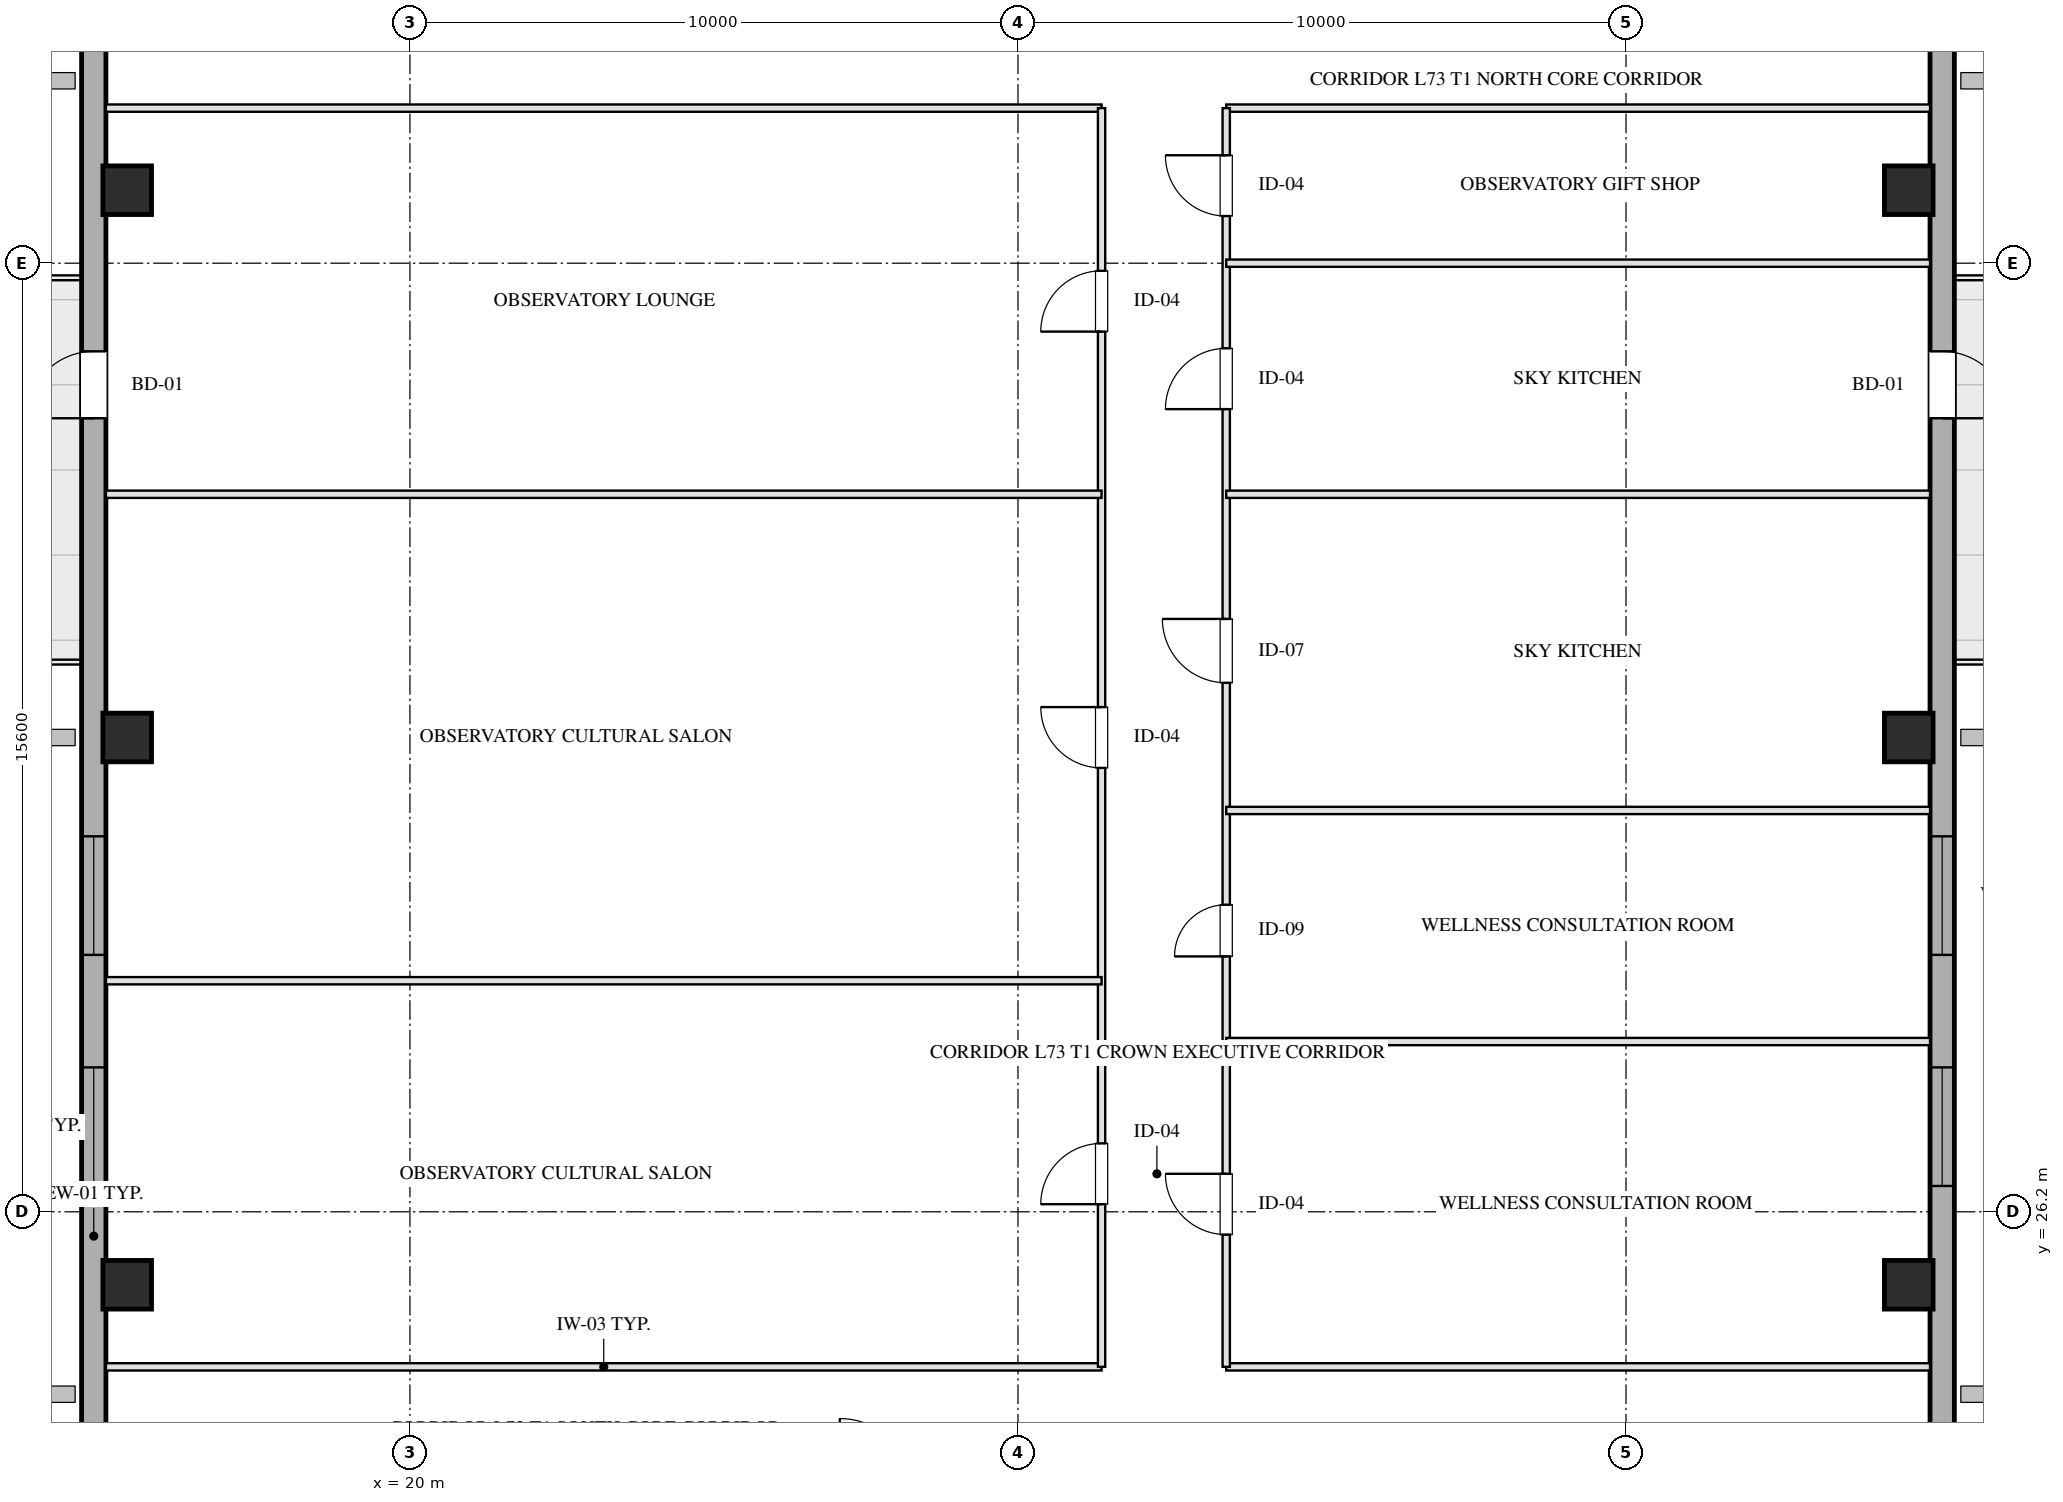
"""IFC4 building model, lengths in metres.
Left out: names, types, materials, properties, quantities, classifications, styles, units other than length and angle.
Written with IfcOpenShell. Run it as: python <this file> out.ifc"""

import sys

from ifc_helpers import new_model, si_unit, direction, frame, frame_2d, origin, origin_2d, place, context, subcontext, project, spatial, rectangle, hollow_rectangle, extrude, element, fill, save


model = new_model("IFC4")
c1 = context("Model", 3, precision=1e-05, world=origin(), true_north=direction((0.0, 1.0)))
c2 = subcontext(c1, "Body", "Model", "MODEL_VIEW")
j1 = project(units=[si_unit("LENGTHUNIT", "METRE"), si_unit("PLANEANGLEUNIT", "RADIAN")], contexts=[c1])
p1 = place(None, origin())
s1 = spatial("IfcSite", under=j1, at=p1, CompositionType="ELEMENT")
p2 = place(p1, origin())
s2 = spatial("IfcBuilding", under=s1, at=p2, CompositionType="ELEMENT")
p3 = place(p2, frame((0.0, 0.0, 266.4)))
s3 = spatial("IfcBuildingStorey", under=s2, at=p3, CompositionType="ELEMENT", Elevation=266.4)
for number, where, z_axis, x_axis in (
    (1, (15.35, 25.0, 0.0), (0.0, 0.0, 1.0), (1.0, 0.0, 0.0)),
    (2, (15.35, 34.0, 0.0), (0.0, 0.0, 1.0), (1.0, 0.0, 0.0)),
    (3, (15.35, 43.0, 0.0), (0.0, 0.0, 1.0), (1.0, 0.0, 0.0)),
    (4, (44.65, 25.0, 0.0), (0.0, 0.0, 1.0), (1.0, 0.0, 0.0)),
    (5, (44.65, 34.0, 0.0), (0.0, 0.0, 1.0), (1.0, 0.0, 0.0)),
    (6, (44.65, 43.0, 0.0), (0.0, 0.0, 1.0), (1.0, 0.0, 0.0)),
):
    element("IfcColumn", number, at=place(p3, frame(where, z_axis=z_axis, x_axis=x_axis)), inside=s3, PredefinedType="COLUMN", context=c2, shape_type="SweptSolid", body=[
        extrude(hollow_rectangle(XDim=0.8, YDim=0.8, WallThickness=0.028, at=origin_2d()), origin(), (0.0, 0.0, 1.0), 3.201),
    ])
p4 = place(p3, frame((14.8, 13.1, 0.0), z_axis=(0.0, 0.0, 1.0), x_axis=(0.0, 1.0, 0.0)))
e7 = element("IfcWall", 7, at=p4, inside=s3, PredefinedType="SOLIDWALL", context=c2, shape_type="SweptSolid", body=[
    extrude(rectangle(XDim=41.8, YDim=0.4, at=frame_2d((20.9, 0.0))), origin(), (0.0, 0.0, 1.0), 2.36),
])
p5 = place(p4, frame((13.525, 0.0, 0.75)))
e8 = element("IfcOpeningElement", 8, at=p5, cuts=e7, PredefinedType="OPENING", context=c2, shape_type="SweptSolid", body=[
    extrude(rectangle(XDim=1.95, YDim=1.21, at=frame_2d((0.975, 0.605))), frame((0.0, 0.21, 0.0), z_axis=(0.0, -1.0, 0.0), x_axis=(1.0, 0.0, 0.0)), (0.0, 0.0, 1.0), 0.42),
])
p6 = place(p4, frame((17.325, 0.0, 0.75)))
e9 = element("IfcOpeningElement", 9, at=p6, cuts=e7, PredefinedType="OPENING", context=c2, shape_type="SweptSolid", body=[
    extrude(rectangle(XDim=1.95, YDim=1.21, at=frame_2d((0.975, 0.605))), frame((0.0, 0.21, 0.0), z_axis=(0.0, -1.0, 0.0), x_axis=(1.0, 0.0, 0.0)), (0.0, 0.0, 1.0), 0.42),
])
p7 = place(p4, frame((26.15, 0.0, 0.0)))
e10 = element("IfcOpeningElement", 10, at=p7, cuts=e7, PredefinedType="OPENING", context=c2, shape_type="SweptSolid", body=[
    extrude(rectangle(XDim=1.1, YDim=2.15, at=frame_2d((0.55, 1.075))), frame((0.0, 0.21, 0.0), z_axis=(0.0, -1.0, 0.0), x_axis=(1.0, 0.0, 0.0)), (0.0, 0.0, 1.0), 0.42),
])
p8 = place(p3, frame((45.2, 54.9, 0.0), z_axis=(0.0, 0.0, 1.0), x_axis=(0.0, -1.0, 0.0)))
e11 = element("IfcWall", 11, at=p8, inside=s3, PredefinedType="SOLIDWALL", context=c2, shape_type="SweptSolid", body=[
    extrude(rectangle(XDim=41.8, YDim=0.4, at=frame_2d((20.9, 0.0))), origin(), (0.0, 0.0, 1.0), 2.36),
])
p9 = place(p8, frame((26.325, 0.0, 0.75)))
e12 = element("IfcOpeningElement", 12, at=p9, cuts=e11, PredefinedType="OPENING", context=c2, shape_type="SweptSolid", body=[
    extrude(rectangle(XDim=1.95, YDim=1.21, at=frame_2d((0.975, 0.605))), frame((0.0, 0.21, 0.0), z_axis=(0.0, -1.0, 0.0), x_axis=(1.0, 0.0, 0.0)), (0.0, 0.0, 1.0), 0.42),
])
p10 = place(p8, frame((22.525, 0.0, 0.75)))
e13 = element("IfcOpeningElement", 13, at=p10, cuts=e11, PredefinedType="OPENING", context=c2, shape_type="SweptSolid", body=[
    extrude(rectangle(XDim=1.95, YDim=1.21, at=frame_2d((0.975, 0.605))), frame((0.0, 0.21, 0.0), z_axis=(0.0, -1.0, 0.0), x_axis=(1.0, 0.0, 0.0)), (0.0, 0.0, 1.0), 0.42),
])
p11 = place(p8, frame((14.55, 0.0, 0.0)))
e14 = element("IfcOpeningElement", 14, at=p11, cuts=e11, PredefinedType="OPENING", context=c2, shape_type="SweptSolid", body=[
    extrude(rectangle(XDim=1.1, YDim=2.15, at=frame_2d((0.55, 1.075))), frame((0.0, 0.21, 0.0), z_axis=(0.0, -1.0, 0.0), x_axis=(1.0, 0.0, 0.0)), (0.0, 0.0, 1.0), 0.42),
])
p12 = place(p3, frame((15.0, 23.65, 0.0), z_axis=(0.0, 0.0, 1.0), x_axis=(1.0, 0.0, 0.0)))
e15 = element("IfcWall", 15, at=p12, inside=s3, PredefinedType="PARTITIONING", context=c2, shape_type="SweptSolid", body=[
    extrude(rectangle(XDim=16.375, YDim=0.12, at=frame_2d((8.188, 0.0))), origin(), (0.0, 0.0, 1.0), 2.925),
])
p13 = place(p3, frame((33.425, 23.65, 0.0), z_axis=(0.0, 0.0, 1.0), x_axis=(1.0, 0.0, 0.0)))
e16 = element("IfcWall", 16, at=p13, inside=s3, PredefinedType="PARTITIONING", context=c2, shape_type="SweptSolid", body=[
    extrude(rectangle(XDim=11.575, YDim=0.12, at=frame_2d((5.788, 0.0))), origin(), (0.0, 0.0, 1.0), 2.925),
])
p14 = place(p3, frame((15.0, 44.35, 0.0), z_axis=(0.0, 0.0, 1.0), x_axis=(1.0, 0.0, 0.0)))
e17 = element("IfcWall", 17, at=p14, inside=s3, PredefinedType="PARTITIONING", context=c2, shape_type="SweptSolid", body=[
    extrude(rectangle(XDim=16.375, YDim=0.12, at=frame_2d((8.188, 0.0))), origin(), (0.0, 0.0, 1.0), 2.925),
])
p15 = place(p3, frame((33.425, 44.35, 0.0), z_axis=(0.0, 0.0, 1.0), x_axis=(1.0, 0.0, 0.0)))
e18 = element("IfcWall", 18, at=p15, inside=s3, PredefinedType="PARTITIONING", context=c2, shape_type="SweptSolid", body=[
    extrude(rectangle(XDim=11.575, YDim=0.12, at=frame_2d((5.788, 0.0))), origin(), (0.0, 0.0, 1.0), 2.925),
])
p16 = place(p3, frame((31.375, 23.65, 0.0), z_axis=(0.0, 0.0, 1.0), x_axis=(0.0, 1.0, 0.0)))
e19 = element("IfcWall", 19, at=p16, inside=s3, PredefinedType="PARTITIONING", context=c2, shape_type="SweptSolid", body=[
    extrude(rectangle(XDim=20.7, YDim=0.12, at=frame_2d((10.35, 0.0))), origin(), (0.0, 0.0, 1.0), 2.925),
])
p17 = place(p16, frame((2.675, 0.0, 0.0)))
e20 = element("IfcOpeningElement", 20, at=p17, cuts=e19, PredefinedType="OPENING", context=c2, shape_type="SweptSolid", body=[
    extrude(rectangle(XDim=1.0, YDim=2.05, at=frame_2d((0.5, 1.025))), frame((0.0, 0.07, 0.0), z_axis=(0.0, -1.0, 0.0), x_axis=(1.0, 0.0, 0.0)), (0.0, 0.0, 1.0), 0.14),
])
p18 = place(p16, frame((9.85, 0.0, 0.0)))
e21 = element("IfcOpeningElement", 21, at=p18, cuts=e19, PredefinedType="OPENING", context=c2, shape_type="SweptSolid", body=[
    extrude(rectangle(XDim=1.0, YDim=2.05, at=frame_2d((0.5, 1.025))), frame((0.0, 0.07, 0.0), z_axis=(0.0, -1.0, 0.0), x_axis=(1.0, 0.0, 0.0)), (0.0, 0.0, 1.0), 0.14),
])
p19 = place(p16, frame((17.025, 0.0, 0.0)))
e22 = element("IfcOpeningElement", 22, at=p19, cuts=e19, PredefinedType="OPENING", context=c2, shape_type="SweptSolid", body=[
    extrude(rectangle(XDim=1.0, YDim=2.05, at=frame_2d((0.5, 1.025))), frame((0.0, 0.07, 0.0), z_axis=(0.0, -1.0, 0.0), x_axis=(1.0, 0.0, 0.0)), (0.0, 0.0, 1.0), 0.14),
])
p20 = place(p3, frame((33.425, 23.65, 0.0), z_axis=(0.0, 0.0, 1.0), x_axis=(0.0, 1.0, 0.0)))
e23 = element("IfcWall", 23, at=p20, inside=s3, PredefinedType="PARTITIONING", context=c2, shape_type="SweptSolid", body=[
    extrude(rectangle(XDim=20.7, YDim=0.12, at=frame_2d((10.35, 0.0))), origin(), (0.0, 0.0, 1.0), 2.925),
])
p21 = place(p20, frame((2.175, 0.0, 0.0)))
e24 = element("IfcOpeningElement", 24, at=p21, cuts=e23, PredefinedType="OPENING", context=c2, shape_type="SweptSolid", body=[
    extrude(rectangle(XDim=1.0, YDim=2.05, at=frame_2d((0.5, 1.025))), frame((0.0, 0.07, 0.0), z_axis=(0.0, -1.0, 0.0), x_axis=(1.0, 0.0, 0.0)), (0.0, 0.0, 1.0), 0.14),
])
p22 = place(p20, frame((6.75, 0.0, 0.0)))
e25 = element("IfcOpeningElement", 25, at=p22, cuts=e23, PredefinedType="OPENING", context=c2, shape_type="SweptSolid", body=[
    extrude(rectangle(XDim=0.85, YDim=2.05, at=frame_2d((0.425, 1.025))), frame((0.0, 0.07, 0.0), z_axis=(0.0, -1.0, 0.0), x_axis=(1.0, 0.0, 0.0)), (0.0, 0.0, 1.0), 0.14),
])
p23 = place(p20, frame((11.25, 0.0, 0.0)))
e26 = element("IfcOpeningElement", 26, at=p23, cuts=e23, PredefinedType="OPENING", context=c2, shape_type="SweptSolid", body=[
    extrude(rectangle(XDim=1.05, YDim=2.05, at=frame_2d((0.525, 1.025))), frame((0.0, 0.07, 0.0), z_axis=(0.0, -1.0, 0.0), x_axis=(1.0, 0.0, 0.0)), (0.0, 0.0, 1.0), 0.14),
])
p24 = place(p20, frame((15.75, 0.0, 0.0)))
e27 = element("IfcOpeningElement", 27, at=p24, cuts=e23, PredefinedType="OPENING", context=c2, shape_type="SweptSolid", body=[
    extrude(rectangle(XDim=1.0, YDim=2.05, at=frame_2d((0.5, 1.025))), frame((0.0, 0.07, 0.0), z_axis=(0.0, -1.0, 0.0), x_axis=(1.0, 0.0, 0.0)), (0.0, 0.0, 1.0), 0.14),
])
p25 = place(p20, frame((18.925, 0.0, 0.0)))
e28 = element("IfcOpeningElement", 28, at=p25, cuts=e23, PredefinedType="OPENING", context=c2, shape_type="SweptSolid", body=[
    extrude(rectangle(XDim=1.0, YDim=2.05, at=frame_2d((0.5, 1.025))), frame((0.0, 0.07, 0.0), z_axis=(0.0, -1.0, 0.0), x_axis=(1.0, 0.0, 0.0)), (0.0, 0.0, 1.0), 0.14),
])
for number, where, z_axis, x_axis in (
    (29, (15.0, 30.0, 0.0), (0.0, 0.0, 1.0), (1.0, 0.0, 0.0)),
    (30, (15.0, 38.0, 0.0), (0.0, 0.0, 1.0), (1.0, 0.0, 0.0)),
):
    element("IfcWall", number, at=place(p3, frame(where, z_axis=z_axis, x_axis=x_axis)), inside=s3, PredefinedType="PARTITIONING", context=c2, shape_type="SweptSolid", body=[
        extrude(rectangle(XDim=16.375, YDim=0.12, at=frame_2d((8.188, 0.0))), origin(), (0.0, 0.0, 1.0), 2.925),
    ])
for number, where, z_axis, x_axis in (
    (31, (33.425, 29.0, 0.0), (0.0, 0.0, 1.0), (1.0, 0.0, 0.0)),
    (32, (33.425, 32.8, 0.0), (0.0, 0.0, 1.0), (1.0, 0.0, 0.0)),
    (33, (33.425, 38.0, 0.0), (0.0, 0.0, 1.0), (1.0, 0.0, 0.0)),
    (34, (33.425, 41.8, 0.0), (0.0, 0.0, 1.0), (1.0, 0.0, 0.0)),
):
    element("IfcWall", number, at=place(p3, frame(where, z_axis=z_axis, x_axis=x_axis)), inside=s3, PredefinedType="PARTITIONING", context=c2, shape_type="SweptSolid", body=[
        extrude(rectangle(XDim=11.575, YDim=0.12, at=frame_2d((5.788, 0.0))), origin(), (0.0, 0.0, 1.0), 2.925),
    ])
p26 = place(p5, origin())
e35 = element("IfcWindow", 35, at=p26, inside=s3, PartitioningType="TRIPLE_PANEL_VERTICAL", PredefinedType="WINDOW", context=c2, shape_type="SweptSolid", body=[
    extrude(rectangle(XDim=1.95, YDim=1.21, at=frame_2d((0.975, 0.605))), frame((0.0, 0.03, 0.0), z_axis=(0.0, -1.0, 0.0), x_axis=(1.0, 0.0, 0.0)), (0.0, 0.0, 1.0), 0.06),
])
fill(e8, e35)
p27 = place(p6, origin())
e36 = element("IfcWindow", 36, at=p27, inside=s3, PartitioningType="TRIPLE_PANEL_VERTICAL", PredefinedType="WINDOW", context=c2, shape_type="SweptSolid", body=[
    extrude(rectangle(XDim=1.95, YDim=1.21, at=frame_2d((0.975, 0.605))), frame((0.0, 0.03, 0.0), z_axis=(0.0, -1.0, 0.0), x_axis=(1.0, 0.0, 0.0)), (0.0, 0.0, 1.0), 0.06),
])
fill(e9, e36)
p28 = place(p9, origin())
e37 = element("IfcWindow", 37, at=p28, inside=s3, PartitioningType="TRIPLE_PANEL_VERTICAL", PredefinedType="WINDOW", context=c2, shape_type="SweptSolid", body=[
    extrude(rectangle(XDim=1.95, YDim=1.21, at=frame_2d((0.975, 0.605))), frame((0.0, 0.03, 0.0), z_axis=(0.0, -1.0, 0.0), x_axis=(1.0, 0.0, 0.0)), (0.0, 0.0, 1.0), 0.06),
])
fill(e12, e37)
p29 = place(p10, origin())
e38 = element("IfcWindow", 38, at=p29, inside=s3, PartitioningType="TRIPLE_PANEL_VERTICAL", PredefinedType="WINDOW", context=c2, shape_type="SweptSolid", body=[
    extrude(rectangle(XDim=1.95, YDim=1.21, at=frame_2d((0.975, 0.605))), frame((0.0, 0.03, 0.0), z_axis=(0.0, -1.0, 0.0), x_axis=(1.0, 0.0, 0.0)), (0.0, 0.0, 1.0), 0.06),
])
fill(e13, e38)
p30 = place(p7, origin())
e39 = element("IfcDoor", 39, at=p30, inside=s3, OperationType="SINGLE_SWING_LEFT", PredefinedType="DOOR", context=c2, shape_type="SweptSolid", body=[
    extrude(rectangle(XDim=1.1, YDim=2.15, at=frame_2d((0.55, 1.075))), frame((0.0, 0.025, 0.0), z_axis=(0.0, -1.0, 0.0), x_axis=(1.0, 0.0, 0.0)), (0.0, 0.0, 1.0), 0.05),
])
fill(e10, e39)
p31 = place(p11, origin())
e40 = element("IfcDoor", 40, at=p31, inside=s3, OperationType="SINGLE_SWING_RIGHT", PredefinedType="DOOR", context=c2, shape_type="SweptSolid", body=[
    extrude(rectangle(XDim=1.1, YDim=2.15, at=frame_2d((0.55, 1.075))), frame((0.0, 0.025, 0.0), z_axis=(0.0, -1.0, 0.0), x_axis=(1.0, 0.0, 0.0)), (0.0, 0.0, 1.0), 0.05),
])
fill(e14, e40)
p32 = place(p17, origin())
e41 = element("IfcDoor", 41, at=p32, inside=s3, OperationType="SINGLE_SWING_LEFT", PredefinedType="DOOR", context=c2, shape_type="SweptSolid", body=[
    extrude(rectangle(XDim=1.0, YDim=2.05, at=frame_2d((0.5, 1.025))), frame((0.0, 0.025, 0.0), z_axis=(0.0, -1.0, 0.0), x_axis=(1.0, 0.0, 0.0)), (0.0, 0.0, 1.0), 0.05),
])
fill(e20, e41)
p33 = place(p18, origin())
e42 = element("IfcDoor", 42, at=p33, inside=s3, OperationType="SINGLE_SWING_RIGHT", PredefinedType="DOOR", context=c2, shape_type="SweptSolid", body=[
    extrude(rectangle(XDim=1.0, YDim=2.05, at=frame_2d((0.5, 1.025))), frame((0.0, 0.025, 0.0), z_axis=(0.0, -1.0, 0.0), x_axis=(1.0, 0.0, 0.0)), (0.0, 0.0, 1.0), 0.05),
])
fill(e21, e42)
p34 = place(p19, origin())
e43 = element("IfcDoor", 43, at=p34, inside=s3, OperationType="SINGLE_SWING_LEFT", PredefinedType="DOOR", context=c2, shape_type="SweptSolid", body=[
    extrude(rectangle(XDim=1.0, YDim=2.05, at=frame_2d((0.5, 1.025))), frame((0.0, 0.025, 0.0), z_axis=(0.0, -1.0, 0.0), x_axis=(1.0, 0.0, 0.0)), (0.0, 0.0, 1.0), 0.05),
])
fill(e22, e43)
p35 = place(p21, origin())
e44 = element("IfcDoor", 44, at=p35, inside=s3, OperationType="SINGLE_SWING_RIGHT", PredefinedType="DOOR", context=c2, shape_type="SweptSolid", body=[
    extrude(rectangle(XDim=1.0, YDim=2.05, at=frame_2d((0.5, 1.025))), frame((0.0, 0.025, 0.0), z_axis=(0.0, -1.0, 0.0), x_axis=(1.0, 0.0, 0.0)), (0.0, 0.0, 1.0), 0.05),
])
fill(e24, e44)
p36 = place(p22, origin())
e45 = element("IfcDoor", 45, at=p36, inside=s3, OperationType="SINGLE_SWING_LEFT", PredefinedType="DOOR", context=c2, shape_type="SweptSolid", body=[
    extrude(rectangle(XDim=0.85, YDim=2.05, at=frame_2d((0.425, 1.025))), frame((0.0, 0.025, 0.0), z_axis=(0.0, -1.0, 0.0), x_axis=(1.0, 0.0, 0.0)), (0.0, 0.0, 1.0), 0.05),
])
fill(e25, e45)
p37 = place(p23, origin())
e46 = element("IfcDoor", 46, at=p37, inside=s3, OperationType="SINGLE_SWING_RIGHT", PredefinedType="DOOR", context=c2, shape_type="SweptSolid", body=[
    extrude(rectangle(XDim=1.05, YDim=2.05, at=frame_2d((0.525, 1.025))), frame((0.0, 0.025, 0.0), z_axis=(0.0, -1.0, 0.0), x_axis=(1.0, 0.0, 0.0)), (0.0, 0.0, 1.0), 0.05),
])
fill(e26, e46)
p38 = place(p24, origin())
e47 = element("IfcDoor", 47, at=p38, inside=s3, OperationType="SINGLE_SWING_LEFT", PredefinedType="DOOR", context=c2, shape_type="SweptSolid", body=[
    extrude(rectangle(XDim=1.0, YDim=2.05, at=frame_2d((0.5, 1.025))), frame((0.0, 0.025, 0.0), z_axis=(0.0, -1.0, 0.0), x_axis=(1.0, 0.0, 0.0)), (0.0, 0.0, 1.0), 0.05),
])
fill(e27, e47)
p39 = place(p25, origin())
e48 = element("IfcDoor", 48, at=p39, inside=s3, OperationType="SINGLE_SWING_RIGHT", PredefinedType="DOOR", context=c2, shape_type="SweptSolid", body=[
    extrude(rectangle(XDim=1.0, YDim=2.05, at=frame_2d((0.5, 1.025))), frame((0.0, 0.025, 0.0), z_axis=(0.0, -1.0, 0.0), x_axis=(1.0, 0.0, 0.0)), (0.0, 0.0, 1.0), 0.05),
])
fill(e28, e48)
save(model, sys.argv[1])
